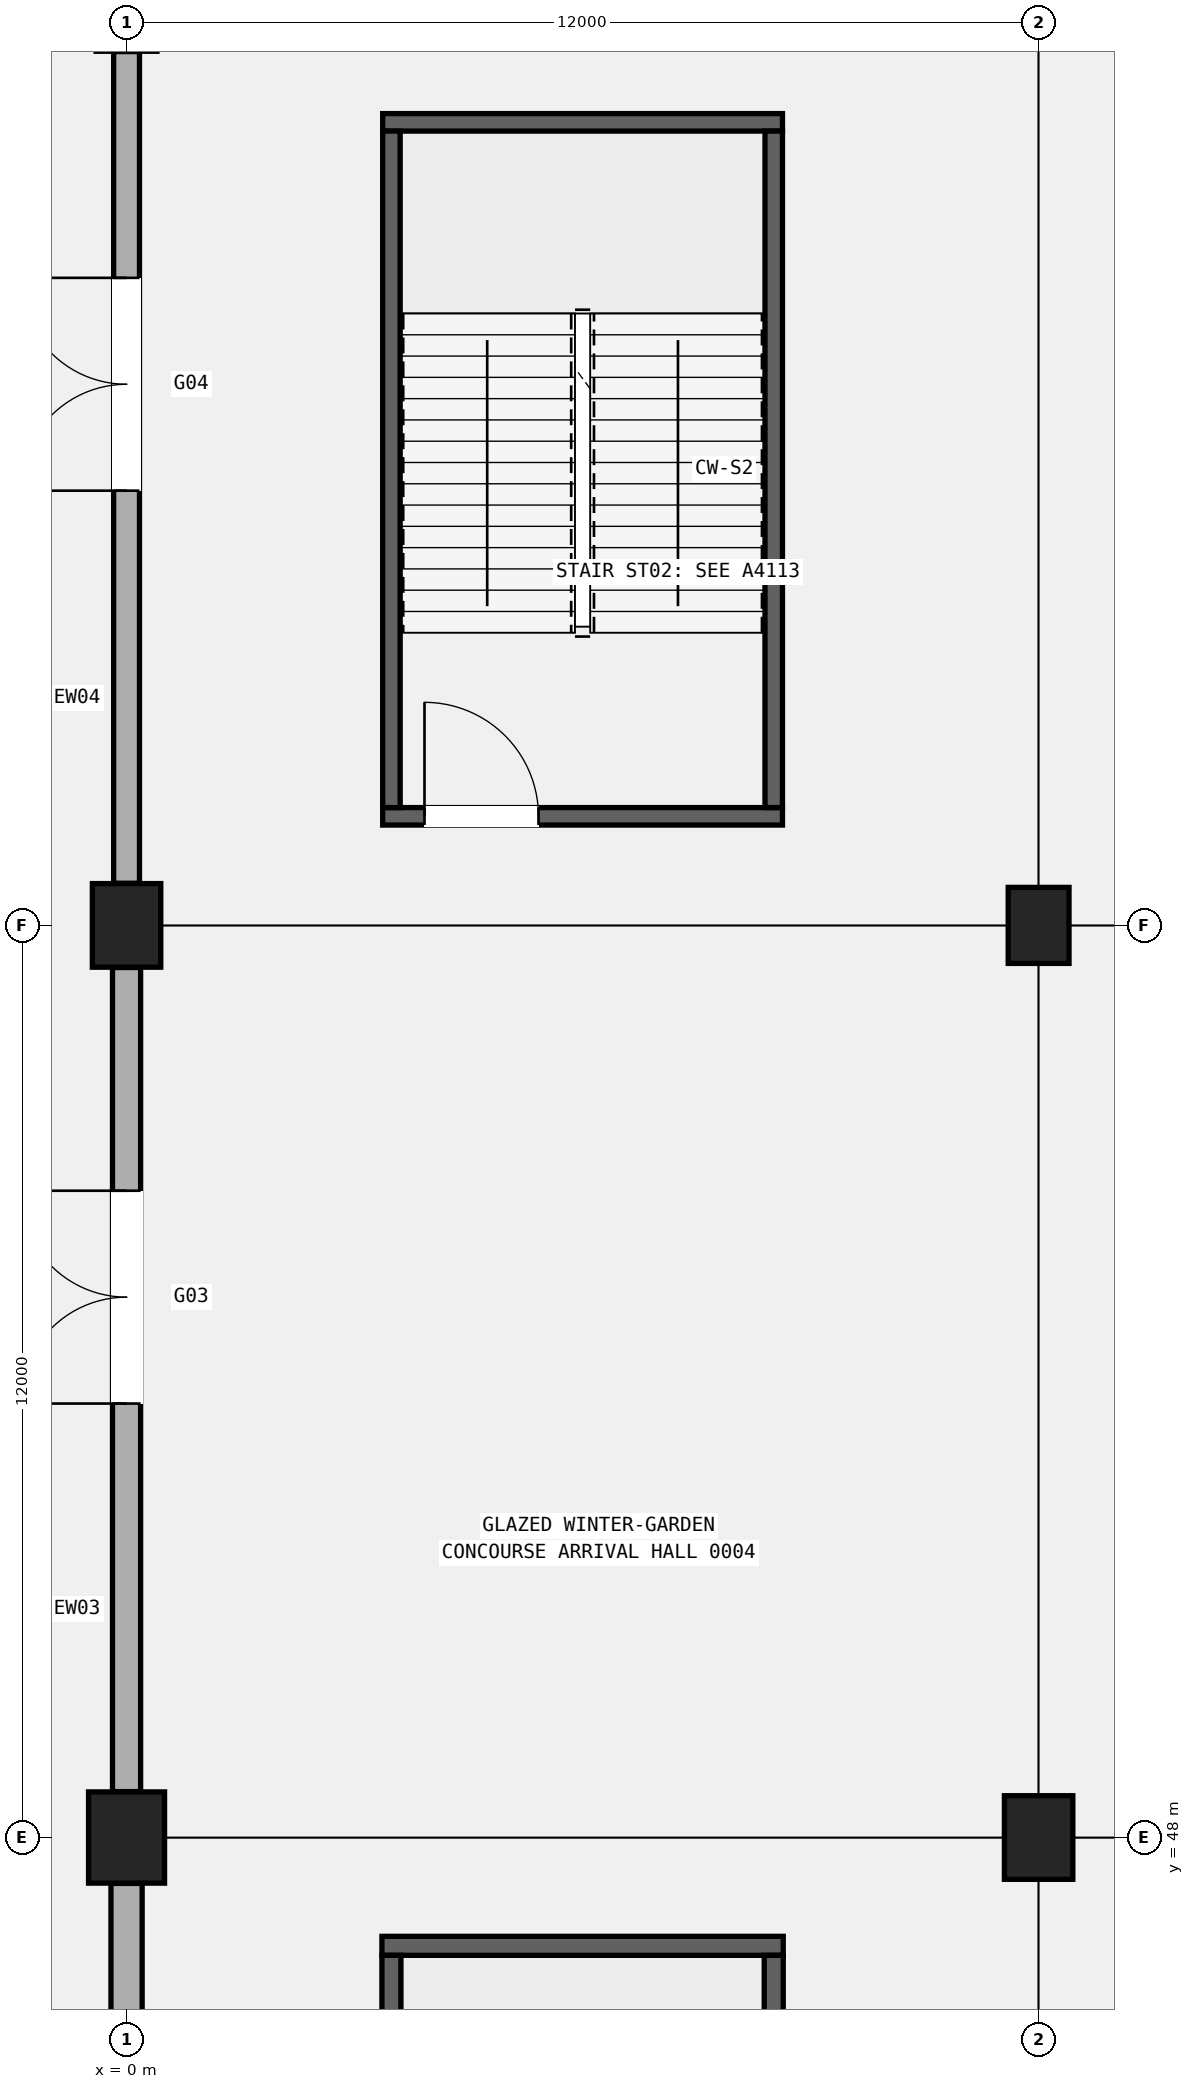
"""IFC4 building model, lengths in metres.
Left out: names, types, materials, properties, quantities, classifications, styles, units other than length and angle.
Written with IfcOpenShell. Run it as: python <this file> out.ifc"""

import sys

from ifc_helpers import new_model, si_unit, direction, frame, frame_2d, origin, origin_2d, place, context, subcontext, project, spatial, rectangle, extrude, element, fill, save


model = new_model("IFC4")
c1 = context("Model", 3, precision=1e-05, world=origin(), true_north=direction((0.0, 1.0)))
c2 = subcontext(c1, "Body", "Model", "MODEL_VIEW")
j1 = project(units=[si_unit("LENGTHUNIT", "METRE"), si_unit("PLANEANGLEUNIT", "RADIAN")], contexts=[c1])
p1 = place(None, origin())
s1 = spatial("IfcSite", under=j1, at=p1, CompositionType="ELEMENT")
p2 = place(p1, origin())
s2 = spatial("IfcBuilding", under=s1, at=p2, CompositionType="ELEMENT")
p3 = place(p2, origin())
s3 = spatial("IfcBuildingStorey", under=s2, at=p3, CompositionType="ELEMENT", Elevation=0.0)
p4 = place(p3, frame((0.0, 48.0, 0.0), z_axis=(0.0, 0.0, 1.0), x_axis=(1.0, 0.0, 0.0)))
e1 = element("IfcColumn", 1, at=p4, inside=s3, PredefinedType="COLUMN", context=c2, shape_type="SweptSolid", body=[
    extrude(rectangle(XDim=1.0, YDim=1.2, at=origin_2d()), origin(), (0.0, 0.0, 1.0), 5.4),
])
for number, where, z_axis, x_axis in (
    (2, (0.0, 60.0, 0.0), (0.0, 0.0, 1.0), (1.0, 0.0, 0.0)),
    (3, (12.0, 48.0, 0.0), (0.0, 0.0, 1.0), (1.0, 0.0, 0.0)),
):
    element("IfcColumn", number, at=place(p3, frame(where, z_axis=z_axis, x_axis=x_axis)), inside=s3, PredefinedType="COLUMN", context=c2, shape_type="SweptSolid", body=[
        extrude(rectangle(XDim=0.9, YDim=1.1, at=origin_2d()), origin(), (0.0, 0.0, 1.0), 5.4),
    ])
p5 = place(p3, frame((12.0, 60.0, 0.0), z_axis=(0.0, 0.0, 1.0), x_axis=(1.0, 0.0, 0.0)))
e4 = element("IfcColumn", 4, at=p5, inside=s3, PredefinedType="COLUMN", context=c2, shape_type="SweptSolid", body=[
    extrude(rectangle(XDim=0.8, YDim=1.0, at=origin_2d()), origin(), (0.0, 0.0, 1.0), 5.4),
])
p6 = place(p3, frame((0.0, 36.429, 0.0), z_axis=(0.0, 0.0, 1.0), x_axis=(0.0, 1.0, 0.0)))
e5 = element("IfcWall", 5, at=p6, inside=s3, PredefinedType="SOLIDWALL", context=c2, shape_type="SweptSolid", body=[
    extrude(rectangle(XDim=10.967, YDim=0.41, at=frame_2d((5.483, 0.0))), origin(), (0.0, 0.0, 1.0), 4.24),
])
p7 = place(p6, frame((5.18, 0.0, 0.0)))
e6 = element("IfcOpeningElement", 6, at=p7, cuts=e5, PredefinedType="OPENING", context=c2, shape_type="SweptSolid", body=[
    extrude(rectangle(XDim=2.8, YDim=2.4, at=frame_2d((1.4, 1.2))), frame((0.0, 0.215, 0.0), z_axis=(0.0, -1.0, 0.0), x_axis=(1.0, 0.0, 0.0)), (0.0, 0.0, 1.0), 0.43),
])
p8 = place(p3, frame((0.0, 48.604, 0.0), z_axis=(0.0, 0.0, 1.0), x_axis=(0.0, 1.0, 0.0)))
e7 = element("IfcWall", 7, at=p8, inside=s3, PredefinedType="SOLIDWALL", context=c2, shape_type="SweptSolid", body=[
    extrude(rectangle(XDim=10.842, YDim=0.37, at=frame_2d((5.421, 0.0))), origin(), (0.0, 0.0, 1.0), 4.34),
])
p9 = place(p8, frame((5.105, 0.0, 0.0)))
e8 = element("IfcOpeningElement", 8, at=p9, cuts=e7, PredefinedType="OPENING", context=c2, shape_type="SweptSolid", body=[
    extrude(rectangle(XDim=2.8, YDim=2.4, at=frame_2d((1.4, 1.2))), frame((0.0, 0.195, 0.0), z_axis=(0.0, -1.0, 0.0), x_axis=(1.0, 0.0, 0.0)), (0.0, 0.0, 1.0), 0.39),
])
p10 = place(p3, frame((0.0, 60.554, 0.0), z_axis=(0.0, 0.0, 1.0), x_axis=(0.0, 1.0, 0.0)))
e9 = element("IfcWall", 9, at=p10, inside=s3, PredefinedType="SOLIDWALL", context=c2, shape_type="SweptSolid", body=[
    extrude(rectangle(XDim=10.942, YDim=0.34, at=frame_2d((5.471, 0.0))), origin(), (0.0, 0.0, 1.0), 4.44),
])
p11 = place(p10, frame((5.165, 0.0, 0.0)))
e10 = element("IfcOpeningElement", 10, at=p11, cuts=e9, PredefinedType="OPENING", context=c2, shape_type="SweptSolid", body=[
    extrude(rectangle(XDim=2.8, YDim=2.4, at=frame_2d((1.4, 1.2))), frame((0.0, 0.18, 0.0), z_axis=(0.0, -1.0, 0.0), x_axis=(1.0, 0.0, 0.0)), (0.0, 0.0, 1.0), 0.36),
])
p12 = place(p3, frame((3.36, 46.575, 0.0), z_axis=(0.0, 0.0, 1.0), x_axis=(1.0, 0.0, 0.0)))
e11 = element("IfcWall", 11, at=p12, inside=s3, PredefinedType="SHEAR", context=c2, shape_type="SweptSolid", body=[
    extrude(rectangle(XDim=5.28, YDim=0.25, at=frame_2d((2.64, 0.0))), origin(), (0.0, 0.0, 1.0), 5.14),
])
for number, where, z_axis, x_axis in (
    (12, (3.485, 37.55, 0.0), (0.0, 0.0, 1.0), (0.0, 1.0, 0.0)),
    (13, (8.515, 37.55, 0.0), (0.0, 0.0, 1.0), (0.0, 1.0, 0.0)),
):
    element("IfcWall", number, at=place(p3, frame(where, z_axis=z_axis, x_axis=x_axis)), inside=s3, PredefinedType="SHEAR", context=c2, shape_type="SweptSolid", body=[
        extrude(rectangle(XDim=8.9, YDim=0.25, at=frame_2d((4.45, 0.0))), origin(), (0.0, 0.0, 1.0), 5.14),
    ])
p13 = place(p3, frame((3.37, 61.435, 0.0), z_axis=(0.0, 0.0, 1.0), x_axis=(1.0, 0.0, 0.0)))
e14 = element("IfcWall", 14, at=p13, inside=s3, PredefinedType="SHEAR", context=c2, shape_type="SweptSolid", body=[
    extrude(rectangle(XDim=5.26, YDim=0.23, at=frame_2d((2.63, 0.0))), origin(), (0.0, 0.0, 1.0), 5.14),
])
p14 = place(p13, frame((0.55, 0.0, 0.0)))
e15 = element("IfcOpeningElement", 15, at=p14, cuts=e14, PredefinedType="OPENING", context=c2, shape_type="SweptSolid", body=[
    extrude(rectangle(XDim=1.5, YDim=2.2, at=frame_2d((0.75, 1.1))), frame((0.0, 0.125, 0.0), z_axis=(0.0, -1.0, 0.0), x_axis=(1.0, 0.0, 0.0)), (0.0, 0.0, 1.0), 0.25),
])
p15 = place(p3, frame((3.37, 70.565, 0.0), z_axis=(0.0, 0.0, 1.0), x_axis=(1.0, 0.0, 0.0)))
e16 = element("IfcWall", 16, at=p15, inside=s3, PredefinedType="SHEAR", context=c2, shape_type="SweptSolid", body=[
    extrude(rectangle(XDim=5.26, YDim=0.23, at=frame_2d((2.63, 0.0))), origin(), (0.0, 0.0, 1.0), 5.14),
])
for number, where, z_axis, x_axis in (
    (17, (3.485, 61.55, 0.0), (0.0, 0.0, 1.0), (0.0, 1.0, 0.0)),
    (18, (8.515, 61.55, 0.0), (0.0, 0.0, 1.0), (0.0, 1.0, 0.0)),
):
    element("IfcWall", number, at=place(p3, frame(where, z_axis=z_axis, x_axis=x_axis)), inside=s3, PredefinedType="SHEAR", context=c2, shape_type="SweptSolid", body=[
        extrude(rectangle(XDim=8.9, YDim=0.23, at=frame_2d((4.45, 0.0))), origin(), (0.0, 0.0, 1.0), 5.14),
    ])
p16 = place(p9, origin())
e19 = element("IfcDoor", 19, at=p16, inside=s3, OperationType="DOUBLE_DOOR_SINGLE_SWING", PredefinedType="DOOR", context=c2, shape_type="SweptSolid", body=[
    extrude(rectangle(XDim=2.8, YDim=2.4, at=frame_2d((1.4, 1.2))), frame((0.0, 0.025, 0.0), z_axis=(0.0, -1.0, 0.0), x_axis=(1.0, 0.0, 0.0)), (0.0, 0.0, 1.0), 0.05),
])
fill(e8, e19)
p17 = place(p11, origin())
e20 = element("IfcDoor", 20, at=p17, inside=s3, OperationType="DOUBLE_DOOR_SINGLE_SWING", PredefinedType="DOOR", context=c2, shape_type="SweptSolid", body=[
    extrude(rectangle(XDim=2.8, YDim=2.4, at=frame_2d((1.4, 1.2))), frame((0.0, 0.025, 0.0), z_axis=(0.0, -1.0, 0.0), x_axis=(1.0, 0.0, 0.0)), (0.0, 0.0, 1.0), 0.05),
])
fill(e10, e20)
p18 = place(p14, origin())
e21 = element("IfcDoor", 21, at=p18, inside=s3, OperationType="SINGLE_SWING_LEFT", PredefinedType="DOOR", context=c2, shape_type="SweptSolid", body=[
    extrude(rectangle(XDim=1.5, YDim=2.2, at=frame_2d((0.75, 1.1))), frame((0.0, 0.025, 0.0), z_axis=(0.0, -1.0, 0.0), x_axis=(1.0, 0.0, 0.0)), (0.0, 0.0, 1.0), 0.05),
])
fill(e15, e21)
save(model, sys.argv[1])
